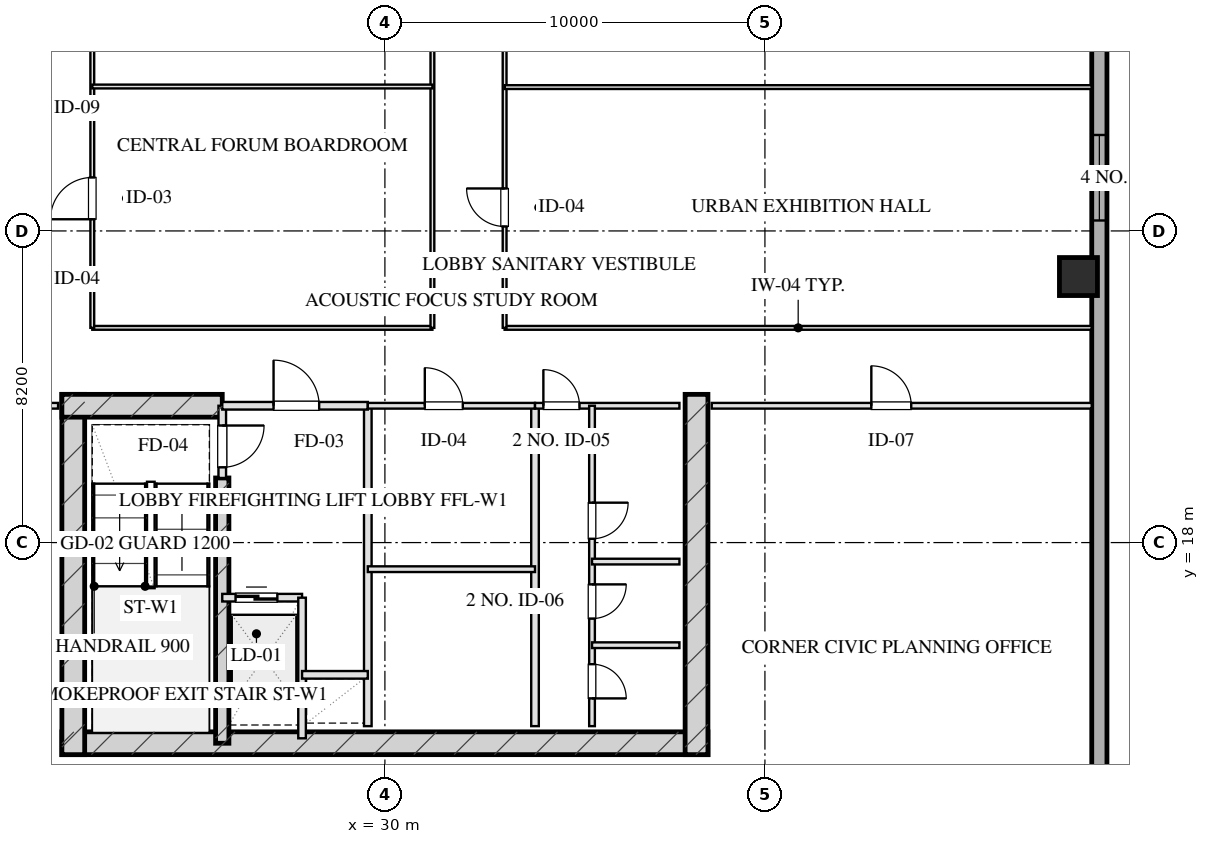
"""IFC4 building model, lengths in metres.
Left out: names, types, materials, properties, quantities, classifications, styles, units other than length and angle.
Written with IfcOpenShell. Run it as: python <this file> out.ifc"""

import sys

from ifc_helpers import new_model, si_unit, direction, frame, frame_2d, origin, origin_2d, place, context, subcontext, project, spatial, rectangle, hollow_rectangle, extrude, element, fill, save


model = new_model("IFC4")
c1 = context("Model", 3, precision=1e-05, world=origin(), true_north=direction((0.0, 1.0)))
c2 = subcontext(c1, "Body", "Model", "MODEL_VIEW")
j1 = project(units=[si_unit("LENGTHUNIT", "METRE"), si_unit("PLANEANGLEUNIT", "RADIAN")], contexts=[c1])
p1 = place(None, origin())
s1 = spatial("IfcSite", under=j1, at=p1, CompositionType="ELEMENT")
p2 = place(p1, origin())
s2 = spatial("IfcBuilding", under=s1, at=p2, CompositionType="ELEMENT")
p3 = place(p2, frame((0.0, 0.0, 149.5)))
s3 = spatial("IfcBuildingStorey", under=s2, at=p3, CompositionType="ELEMENT", Elevation=149.5)
p4 = place(p3, frame((21.5, 12.72, 0.0), z_axis=(0.0, 0.0, 1.0), x_axis=(1.0, 0.0, 0.0)))
e1 = element("IfcWall", 1, at=p4, inside=s3, PredefinedType="SHEAR", context=c2, shape_type="SweptSolid", body=[
    extrude(rectangle(XDim=17.0, YDim=0.6, at=frame_2d((8.5, 0.0))), origin(), (0.0, 0.0, 1.0), 3.45),
])
for number, where, z_axis, x_axis in (
    (2, (21.8, 21.9, 0.0), (0.0, 0.0, 1.0), (0.0, -1.0, 0.0)),
    (3, (38.2, 21.9, 0.0), (0.0, 0.0, 1.0), (0.0, -1.0, 0.0)),
):
    element("IfcWall", number, at=place(p3, frame(where, z_axis=z_axis, x_axis=x_axis)), inside=s3, PredefinedType="SHEAR", context=c2, shape_type="SweptSolid", body=[
        extrude(rectangle(XDim=9.48, YDim=0.6, at=frame_2d((4.74, 0.0))), origin(), (0.0, 0.0, 1.0), 3.45),
    ])
p5 = place(p3, frame((25.72, 19.7, 0.0), z_axis=(0.0, 0.0, 1.0), x_axis=(0.0, -1.0, 0.0)))
e4 = element("IfcWall", 4, at=p5, inside=s3, PredefinedType="SHEAR", context=c2, shape_type="SweptSolid", body=[
    extrude(rectangle(XDim=6.98, YDim=0.35, at=frame_2d((3.49, 0.0))), origin(), (0.0, 0.0, 1.0), 3.45),
])
p6 = place(p3, frame((21.5, 21.6, 0.0), z_axis=(0.0, 0.0, 1.0), x_axis=(1.0, 0.0, 0.0)))
e5 = element("IfcWall", 5, at=p6, inside=s3, PredefinedType="SHEAR", context=c2, shape_type="SweptSolid", body=[
    extrude(rectangle(XDim=4.22, YDim=0.6, at=frame_2d((2.11, 0.0))), origin(), (0.0, 0.0, 1.0), 3.45),
])
p7 = place(p3, frame((48.25, 25.0, 0.0), z_axis=(0.0, 0.0, 1.0), x_axis=(1.0, 0.0, 0.0)))
e6 = element("IfcColumn", 6, at=p7, inside=s3, PredefinedType="COLUMN", context=c2, shape_type="SweptSolid", body=[
    extrude(hollow_rectangle(XDim=1.0, YDim=1.0, WallThickness=0.036, at=origin_2d()), origin(), (0.0, 0.0, 1.0), 3.451),
])
p8 = place(p3, frame((48.8, 59.0, 0.0), z_axis=(0.0, 0.0, 1.0), x_axis=(0.0, -1.0, 0.0)))
e7 = element("IfcWall", 7, at=p8, inside=s3, PredefinedType="SOLIDWALL", context=c2, shape_type="SweptSolid", body=[
    extrude(rectangle(XDim=50.0, YDim=0.4, at=frame_2d((25.0, 0.0))), origin(), (0.0, 0.0, 1.0), 2.61),
])
p9 = place(p8, frame((30.275, 0.0, 0.75)))
e8 = element("IfcOpeningElement", 8, at=p9, cuts=e7, PredefinedType="OPENING", context=c2, shape_type="SweptSolid", body=[
    extrude(rectangle(XDim=2.25, YDim=1.46, at=frame_2d((1.125, 0.73))), frame((0.0, 0.21, 0.0), z_axis=(0.0, -1.0, 0.0), x_axis=(1.0, 0.0, 0.0)), (0.0, 0.0, 1.0), 0.42),
])
p10 = place(p8, frame((17.475, 0.0, 0.75)))
e9 = element("IfcOpeningElement", 9, at=p10, cuts=e7, PredefinedType="OPENING", context=c2, shape_type="SweptSolid", body=[
    extrude(rectangle(XDim=2.25, YDim=1.46, at=frame_2d((1.125, 0.73))), frame((0.0, 0.21, 0.0), z_axis=(0.0, -1.0, 0.0), x_axis=(1.0, 0.0, 0.0)), (0.0, 0.0, 1.0), 0.42),
])
p11 = place(p3, frame((25.72, 21.6, 0.0), z_axis=(0.0, 0.0, 1.0), x_axis=(0.0, -1.0, 0.0)))
e10 = element("IfcWall", 10, at=p11, inside=s3, PredefinedType="PARTITIONING", context=c2, shape_type="SweptSolid", body=[
    extrude(rectangle(XDim=1.9, YDim=0.2, at=frame_2d((0.95, 0.0))), origin(), (0.0, 0.0, 1.0), 3.175),
])
p12 = place(p11, frame((0.52, 0.0, 0.0)))
e11 = element("IfcOpeningElement", 11, at=p12, cuts=e10, PredefinedType="OPENING", context=c2, shape_type="SweptSolid", body=[
    extrude(rectangle(XDim=1.1, YDim=2.05, at=frame_2d((0.55, 1.025))), frame((0.0, 0.11, 0.0), z_axis=(0.0, -1.0, 0.0), x_axis=(1.0, 0.0, 0.0)), (0.0, 0.0, 1.0), 0.22),
])
p13 = place(p3, frame((29.55, 21.6, 0.0), z_axis=(0.0, 0.0, 1.0), x_axis=(0.0, -1.0, 0.0)))
e12 = element("IfcWall", 12, at=p13, inside=s3, PredefinedType="PARTITIONING", context=c2, shape_type="SweptSolid", body=[
    extrude(rectangle(XDim=8.43, YDim=0.2, at=frame_2d((4.215, 0.0))), origin(), (0.0, 0.0, 1.0), 3.175),
])
p14 = place(p3, frame((25.72, 21.6, 0.0), z_axis=(0.0, 0.0, 1.0), x_axis=(1.0, 0.0, 0.0)))
e13 = element("IfcWall", 13, at=p14, inside=s3, PredefinedType="PARTITIONING", context=c2, shape_type="SweptSolid", body=[
    extrude(rectangle(XDim=3.83, YDim=0.2, at=frame_2d((1.915, 0.0))), origin(), (0.0, 0.0, 1.0), 3.175),
])
p15 = place(p14, frame((1.35, 0.0, 0.0)))
e14 = element("IfcOpeningElement", 14, at=p15, cuts=e13, PredefinedType="OPENING", context=c2, shape_type="SweptSolid", body=[
    extrude(rectangle(XDim=1.2, YDim=2.05, at=frame_2d((0.6, 1.025))), frame((0.0, 0.11, 0.0), z_axis=(0.0, -1.0, 0.0), x_axis=(1.0, 0.0, 0.0)), (0.0, 0.0, 1.0), 0.22),
])
p16 = place(p3, frame((25.72, 16.55, 0.0), z_axis=(0.0, 0.0, 1.0), x_axis=(1.0, 0.0, 0.0)))
e15 = element("IfcWall", 15, at=p16, inside=s3, PredefinedType="PARTITIONING", context=c2, shape_type="SweptSolid", body=[
    extrude(rectangle(XDim=2.1, YDim=0.2, at=frame_2d((1.05, 0.0))), origin(), (0.0, 0.0, 1.0), 3.175),
])
p17 = place(p16, frame((0.35, 0.0, 0.0)))
e16 = element("IfcOpeningElement", 16, at=p17, cuts=e15, PredefinedType="OPENING", context=c2, shape_type="SweptSolid", body=[
    extrude(rectangle(XDim=1.1, YDim=2.05, at=frame_2d((0.55, 1.025))), frame((0.0, 0.11, 0.0), z_axis=(0.0, -1.0, 0.0), x_axis=(1.0, 0.0, 0.0)), (0.0, 0.0, 1.0), 0.22),
])
p18 = place(p3, frame((27.82, 16.55, 0.0), z_axis=(0.0, 0.0, 1.0), x_axis=(0.0, -1.0, 0.0)))
e17 = element("IfcWall", 17, at=p18, inside=s3, PredefinedType="PARTITIONING", context=c2, shape_type="SweptSolid", body=[
    extrude(rectangle(XDim=3.7, YDim=0.2, at=frame_2d((1.85, 0.0))), origin(), (0.0, 0.0, 1.0), 3.175),
])
p19 = place(p3, frame((27.82, 14.52, 0.0), z_axis=(0.0, 0.0, 1.0), x_axis=(1.0, 0.0, 0.0)))
e18 = element("IfcWall", 18, at=p19, inside=s3, PredefinedType="PARTITIONING", context=c2, shape_type="SweptSolid", body=[
    extrude(rectangle(XDim=1.73, YDim=0.2, at=frame_2d((0.865, 0.0))), origin(), (0.0, 0.0, 1.0), 3.175),
])
p20 = place(p3, frame((33.95, 21.6, 0.0), z_axis=(0.0, 0.0, 1.0), x_axis=(0.0, -1.0, 0.0)))
e19 = element("IfcWall", 19, at=p20, inside=s3, PredefinedType="PARTITIONING", context=c2, shape_type="SweptSolid", body=[
    extrude(rectangle(XDim=8.43, YDim=0.2, at=frame_2d((4.215, 0.0))), origin(), (0.0, 0.0, 1.0), 3.175),
])
p21 = place(p3, frame((29.55, 21.6, 0.0), z_axis=(0.0, 0.0, 1.0), x_axis=(1.0, 0.0, 0.0)))
e20 = element("IfcWall", 20, at=p21, inside=s3, PredefinedType="PARTITIONING", context=c2, shape_type="SweptSolid", body=[
    extrude(rectangle(XDim=4.4, YDim=0.15, at=frame_2d((2.2, 0.0))), origin(), (0.0, 0.0, 1.0), 3.175),
])
p22 = place(p21, frame((1.5, 0.0, 0.0)))
e21 = element("IfcOpeningElement", 21, at=p22, cuts=e20, PredefinedType="OPENING", context=c2, shape_type="SweptSolid", body=[
    extrude(rectangle(XDim=1.0, YDim=2.05, at=frame_2d((0.5, 1.025))), frame((0.0, 0.085, 0.0), z_axis=(0.0, -1.0, 0.0), x_axis=(1.0, 0.0, 0.0)), (0.0, 0.0, 1.0), 0.17),
])
p23 = place(p3, frame((29.55, 17.3, 0.0), z_axis=(0.0, 0.0, 1.0), x_axis=(1.0, 0.0, 0.0)))
e22 = element("IfcWall", 22, at=p23, inside=s3, PredefinedType="PARTITIONING", context=c2, shape_type="SweptSolid", body=[
    extrude(rectangle(XDim=4.4, YDim=0.15, at=frame_2d((2.2, 0.0))), origin(), (0.0, 0.0, 1.0), 3.175),
])
p24 = place(p3, frame((33.95, 21.6, 0.0), z_axis=(0.0, 0.0, 1.0), x_axis=(1.0, 0.0, 0.0)))
e23 = element("IfcWall", 23, at=p24, inside=s3, PredefinedType="PARTITIONING", context=c2, shape_type="SweptSolid", body=[
    extrude(rectangle(XDim=3.8, YDim=0.15, at=frame_2d((1.9, 0.0))), origin(), (0.0, 0.0, 1.0), 3.175),
])
p25 = place(p24, frame((0.22, 0.0, 0.0)))
e24 = element("IfcOpeningElement", 24, at=p25, cuts=e23, PredefinedType="OPENING", context=c2, shape_type="SweptSolid", body=[
    extrude(rectangle(XDim=0.95, YDim=2.05, at=frame_2d((0.475, 1.025))), frame((0.0, 0.085, 0.0), z_axis=(0.0, -1.0, 0.0), x_axis=(1.0, 0.0, 0.0)), (0.0, 0.0, 1.0), 0.17),
])
p26 = place(p3, frame((35.45, 21.6, 0.0), z_axis=(0.0, 0.0, 1.0), x_axis=(0.0, -1.0, 0.0)))
e25 = element("IfcWall", 25, at=p26, inside=s3, PredefinedType="PARTITIONING", context=c2, shape_type="SweptSolid", body=[
    extrude(rectangle(XDim=8.43, YDim=0.15, at=frame_2d((4.215, 0.0))), origin(), (0.0, 0.0, 1.0), 2.815),
])
p27 = place(p26, frame((2.55, 0.0, 0.0)))
e26 = element("IfcOpeningElement", 26, at=p27, cuts=e25, PredefinedType="OPENING", context=c2, shape_type="SweptSolid", body=[
    extrude(rectangle(XDim=0.95, YDim=2.05, at=frame_2d((0.475, 1.025))), frame((0.0, 0.085, 0.0), z_axis=(0.0, -1.0, 0.0), x_axis=(1.0, 0.0, 0.0)), (0.0, 0.0, 1.0), 0.17),
])
p28 = place(p26, frame((4.7, 0.0, 0.0)))
e27 = element("IfcOpeningElement", 27, at=p28, cuts=e25, PredefinedType="OPENING", context=c2, shape_type="SweptSolid", body=[
    extrude(rectangle(XDim=0.9, YDim=2.05, at=frame_2d((0.45, 1.025))), frame((0.0, 0.085, 0.0), z_axis=(0.0, -1.0, 0.0), x_axis=(1.0, 0.0, 0.0)), (0.0, 0.0, 1.0), 0.17),
])
p29 = place(p26, frame((6.8, 0.0, 0.0)))
e28 = element("IfcOpeningElement", 28, at=p29, cuts=e25, PredefinedType="OPENING", context=c2, shape_type="SweptSolid", body=[
    extrude(rectangle(XDim=0.9, YDim=2.05, at=frame_2d((0.45, 1.025))), frame((0.0, 0.085, 0.0), z_axis=(0.0, -1.0, 0.0), x_axis=(1.0, 0.0, 0.0)), (0.0, 0.0, 1.0), 0.17),
])
for number, where, z_axis, x_axis in (
    (29, (35.45, 17.5, 0.0), (0.0, 0.0, 1.0), (1.0, 0.0, 0.0)),
    (30, (35.45, 15.3, 0.0), (0.0, 0.0, 1.0), (1.0, 0.0, 0.0)),
):
    element("IfcWall", number, at=place(p3, frame(where, z_axis=z_axis, x_axis=x_axis)), inside=s3, PredefinedType="PARTITIONING", context=c2, shape_type="SweptSolid", body=[
        extrude(rectangle(XDim=2.3, YDim=0.15, at=frame_2d((1.15, 0.0))), origin(), (0.0, 0.0, 1.0), 3.175),
    ])
p30 = place(p3, frame((11.4, 21.6, 0.0), z_axis=(0.0, 0.0, 1.0), x_axis=(1.0, 0.0, 0.0)))
e31 = element("IfcWall", 31, at=p30, inside=s3, PredefinedType="PARTITIONING", context=c2, shape_type="SweptSolid", body=[
    extrude(rectangle(XDim=10.0, YDim=0.15, at=frame_2d((5.0, 0.0))), origin(), (0.0, 0.0, 1.0), 3.175),
])
p31 = place(p30, frame((4.2, 0.0, 0.0)))
e32 = element("IfcOpeningElement", 32, at=p31, cuts=e31, PredefinedType="OPENING", context=c2, shape_type="SweptSolid", body=[
    extrude(rectangle(XDim=1.0, YDim=2.05, at=frame_2d((0.5, 1.025))), frame((0.0, 0.085, 0.0), z_axis=(0.0, -1.0, 0.0), x_axis=(1.0, 0.0, 0.0)), (0.0, 0.0, 1.0), 0.17),
])
p32 = place(p3, frame((38.6, 21.6, 0.0), z_axis=(0.0, 0.0, 1.0), x_axis=(1.0, 0.0, 0.0)))
e33 = element("IfcWall", 33, at=p32, inside=s3, PredefinedType="PARTITIONING", context=c2, shape_type="SweptSolid", body=[
    extrude(rectangle(XDim=10.0, YDim=0.15, at=frame_2d((5.0, 0.0))), origin(), (0.0, 0.0, 1.0), 3.175),
])
p33 = place(p32, frame((4.2, 0.0, 0.0)))
e34 = element("IfcOpeningElement", 34, at=p33, cuts=e33, PredefinedType="OPENING", context=c2, shape_type="SweptSolid", body=[
    extrude(rectangle(XDim=1.05, YDim=2.05, at=frame_2d((0.525, 1.025))), frame((0.0, 0.085, 0.0), z_axis=(0.0, -1.0, 0.0), x_axis=(1.0, 0.0, 0.0)), (0.0, 0.0, 1.0), 0.17),
])
p34 = place(p3, frame((22.3, 23.65, 0.0), z_axis=(0.0, 0.0, 1.0), x_axis=(1.0, 0.0, 0.0)))
e35 = element("IfcWall", 35, at=p34, inside=s3, PredefinedType="MOVABLE", context=c2, shape_type="SweptSolid", body=[
    extrude(rectangle(XDim=8.95, YDim=0.1, at=frame_2d((4.475, 0.0))), origin(), (0.0, 0.0, 1.0), 3.175),
])
p35 = place(p3, frame((33.15, 23.65, 0.0), z_axis=(0.0, 0.0, 1.0), x_axis=(1.0, 0.0, 0.0)))
e36 = element("IfcWall", 36, at=p35, inside=s3, PredefinedType="MOVABLE", context=c2, shape_type="SweptSolid", body=[
    extrude(rectangle(XDim=15.45, YDim=0.1, at=frame_2d((7.725, 0.0))), origin(), (0.0, 0.0, 1.0), 3.175),
])
p36 = place(p3, frame((22.3, 23.65, 0.0), z_axis=(0.0, 0.0, 1.0), x_axis=(0.0, 1.0, 0.0)))
e37 = element("IfcWall", 37, at=p36, inside=s3, PredefinedType="MOVABLE", context=c2, shape_type="SweptSolid", body=[
    extrude(rectangle(XDim=20.7, YDim=0.1, at=frame_2d((10.35, 0.0))), origin(), (0.0, 0.0, 1.0), 3.175),
])
p37 = place(p36, frame((2.857, 0.0, 0.0)))
e38 = element("IfcOpeningElement", 38, at=p37, cuts=e37, PredefinedType="OPENING", context=c2, shape_type="SweptSolid", body=[
    extrude(rectangle(XDim=1.1, YDim=2.05, at=frame_2d((0.55, 1.025))), frame((0.0, 0.06, 0.0), z_axis=(0.0, -1.0, 0.0), x_axis=(1.0, 0.0, 0.0)), (0.0, 0.0, 1.0), 0.12),
])
p38 = place(p36, frame((17.208, 0.0, 0.0)))
e39 = element("IfcOpeningElement", 39, at=p38, cuts=e37, PredefinedType="OPENING", context=c2, shape_type="SweptSolid", body=[
    extrude(rectangle(XDim=1.1, YDim=2.05, at=frame_2d((0.55, 1.025))), frame((0.0, 0.06, 0.0), z_axis=(0.0, -1.0, 0.0), x_axis=(1.0, 0.0, 0.0)), (0.0, 0.0, 1.0), 0.12),
])
p39 = place(p3, frame((31.25, 23.65, 0.0), z_axis=(0.0, 0.0, 1.0), x_axis=(0.0, 1.0, 0.0)))
e40 = element("IfcWall", 40, at=p39, inside=s3, PredefinedType="MOVABLE", context=c2, shape_type="SweptSolid", body=[
    extrude(rectangle(XDim=20.7, YDim=0.1, at=frame_2d((10.35, 0.0))), origin(), (0.0, 0.0, 1.0), 3.175),
])
p40 = place(p39, frame((9.71, 0.0, 0.0)))
e41 = element("IfcOpeningElement", 41, at=p40, cuts=e40, PredefinedType="OPENING", context=c2, shape_type="SweptSolid", body=[
    extrude(rectangle(XDim=1.1, YDim=2.05, at=frame_2d((0.55, 1.025))), frame((0.0, 0.06, 0.0), z_axis=(0.0, -1.0, 0.0), x_axis=(1.0, 0.0, 0.0)), (0.0, 0.0, 1.0), 0.12),
])
p41 = place(p3, frame((33.15, 23.65, 0.0), z_axis=(0.0, 0.0, 1.0), x_axis=(0.0, 1.0, 0.0)))
e42 = element("IfcWall", 42, at=p41, inside=s3, PredefinedType="MOVABLE", context=c2, shape_type="SweptSolid", body=[
    extrude(rectangle(XDim=20.7, YDim=0.1, at=frame_2d((10.35, 0.0))), origin(), (0.0, 0.0, 1.0), 3.175),
])
p42 = place(p41, frame((2.667, 0.0, 0.0)))
e43 = element("IfcOpeningElement", 43, at=p42, cuts=e42, PredefinedType="OPENING", context=c2, shape_type="SweptSolid", body=[
    extrude(rectangle(XDim=1.0, YDim=2.05, at=frame_2d((0.5, 1.025))), frame((0.0, 0.06, 0.0), z_axis=(0.0, -1.0, 0.0), x_axis=(1.0, 0.0, 0.0)), (0.0, 0.0, 1.0), 0.12),
])
p43 = place(p41, frame((9.843, 0.0, 0.0)))
e44 = element("IfcOpeningElement", 44, at=p43, cuts=e42, PredefinedType="OPENING", context=c2, shape_type="SweptSolid", body=[
    extrude(rectangle(XDim=1.0, YDim=2.05, at=frame_2d((0.5, 1.025))), frame((0.0, 0.06, 0.0), z_axis=(0.0, -1.0, 0.0), x_axis=(1.0, 0.0, 0.0)), (0.0, 0.0, 1.0), 0.12),
])
p44 = place(p41, frame((17.025, 0.0, 0.0)))
e45 = element("IfcOpeningElement", 45, at=p44, cuts=e42, PredefinedType="OPENING", context=c2, shape_type="SweptSolid", body=[
    extrude(rectangle(XDim=1.0, YDim=2.05, at=frame_2d((0.5, 1.025))), frame((0.0, 0.06, 0.0), z_axis=(0.0, -1.0, 0.0), x_axis=(1.0, 0.0, 0.0)), (0.0, 0.0, 1.0), 0.12),
])
p45 = place(p3, frame((22.3, 30.0, 0.0), z_axis=(0.0, 0.0, 1.0), x_axis=(1.0, 0.0, 0.0)))
e46 = element("IfcWall", 46, at=p45, inside=s3, PredefinedType="MOVABLE", context=c2, shape_type="SweptSolid", body=[
    extrude(rectangle(XDim=8.95, YDim=0.1, at=frame_2d((4.475, 0.0))), origin(), (0.0, 0.0, 1.0), 3.175),
])
p46 = place(p3, frame((33.15, 29.985, 0.0), z_axis=(0.0, 0.0, 1.0), x_axis=(1.0, 0.0, 0.0)))
e47 = element("IfcWall", 47, at=p46, inside=s3, PredefinedType="MOVABLE", context=c2, shape_type="SweptSolid", body=[
    extrude(rectangle(XDim=15.45, YDim=0.1, at=frame_2d((7.725, 0.0))), origin(), (0.0, 0.0, 1.0), 3.175),
])
p47 = place(p9, origin())
e48 = element("IfcWindow", 48, at=p47, inside=s3, PartitioningType="TRIPLE_PANEL_VERTICAL", PredefinedType="WINDOW", context=c2, shape_type="SweptSolid", body=[
    extrude(rectangle(XDim=2.25, YDim=1.46, at=frame_2d((1.125, 0.73))), frame((0.0, 0.03, 0.0), z_axis=(0.0, -1.0, 0.0), x_axis=(1.0, 0.0, 0.0)), (0.0, 0.0, 1.0), 0.06),
])
fill(e8, e48)
p48 = place(p12, origin())
e49 = element("IfcDoor", 49, at=p48, inside=s3, OperationType="SINGLE_SWING_LEFT", PredefinedType="DOOR", context=c2, shape_type="SweptSolid", body=[
    extrude(rectangle(XDim=1.1, YDim=2.05, at=frame_2d((0.55, 1.025))), frame((0.0, 0.025, 0.0), z_axis=(0.0, -1.0, 0.0), x_axis=(1.0, 0.0, 0.0)), (0.0, 0.0, 1.0), 0.05),
])
fill(e11, e49)
p49 = place(p15, origin())
e50 = element("IfcDoor", 50, at=p49, inside=s3, OperationType="SINGLE_SWING_LEFT", PredefinedType="DOOR", context=c2, shape_type="SweptSolid", body=[
    extrude(rectangle(XDim=1.2, YDim=2.05, at=frame_2d((0.6, 1.025))), frame((0.0, 0.025, 0.0), z_axis=(0.0, -1.0, 0.0), x_axis=(1.0, 0.0, 0.0)), (0.0, 0.0, 1.0), 0.05),
])
fill(e14, e50)
p50 = place(p17, origin())
e51 = element("IfcDoor", 51, at=p50, inside=s3, OperationType="DOUBLE_DOOR_SLIDING", PredefinedType="DOOR", context=c2, shape_type="SweptSolid", body=[
    extrude(rectangle(XDim=1.1, YDim=2.05, at=frame_2d((0.55, 1.025))), frame((0.0, 0.025, 0.0), z_axis=(0.0, -1.0, 0.0), x_axis=(1.0, 0.0, 0.0)), (0.0, 0.0, 1.0), 0.05),
])
fill(e16, e51)
p51 = place(p22, origin())
e52 = element("IfcDoor", 52, at=p51, inside=s3, OperationType="SINGLE_SWING_LEFT", PredefinedType="DOOR", context=c2, shape_type="SweptSolid", body=[
    extrude(rectangle(XDim=1.0, YDim=2.05, at=frame_2d((0.5, 1.025))), frame((0.0, 0.025, 0.0), z_axis=(0.0, -1.0, 0.0), x_axis=(1.0, 0.0, 0.0)), (0.0, 0.0, 1.0), 0.05),
])
fill(e21, e52)
p52 = place(p25, origin())
e53 = element("IfcDoor", 53, at=p52, inside=s3, OperationType="SINGLE_SWING_LEFT", PredefinedType="DOOR", context=c2, shape_type="SweptSolid", body=[
    extrude(rectangle(XDim=0.95, YDim=2.05, at=frame_2d((0.475, 1.025))), frame((0.0, 0.025, 0.0), z_axis=(0.0, -1.0, 0.0), x_axis=(1.0, 0.0, 0.0)), (0.0, 0.0, 1.0), 0.05),
])
fill(e24, e53)
p53 = place(p27, origin())
e54 = element("IfcDoor", 54, at=p53, inside=s3, OperationType="SINGLE_SWING_LEFT", PredefinedType="DOOR", context=c2, shape_type="SweptSolid", body=[
    extrude(rectangle(XDim=0.95, YDim=2.05, at=frame_2d((0.475, 1.025))), frame((0.0, 0.025, 0.0), z_axis=(0.0, -1.0, 0.0), x_axis=(1.0, 0.0, 0.0)), (0.0, 0.0, 1.0), 0.05),
])
fill(e26, e54)
p54 = place(p28, origin())
e55 = element("IfcDoor", 55, at=p54, inside=s3, OperationType="SINGLE_SWING_LEFT", PredefinedType="DOOR", context=c2, shape_type="SweptSolid", body=[
    extrude(rectangle(XDim=0.9, YDim=2.05, at=frame_2d((0.45, 1.025))), frame((0.0, 0.025, 0.0), z_axis=(0.0, -1.0, 0.0), x_axis=(1.0, 0.0, 0.0)), (0.0, 0.0, 1.0), 0.05),
])
fill(e27, e55)
p55 = place(p29, origin())
e56 = element("IfcDoor", 56, at=p55, inside=s3, OperationType="SINGLE_SWING_RIGHT", PredefinedType="DOOR", context=c2, shape_type="SweptSolid", body=[
    extrude(rectangle(XDim=0.9, YDim=2.05, at=frame_2d((0.45, 1.025))), frame((0.0, 0.025, 0.0), z_axis=(0.0, -1.0, 0.0), x_axis=(1.0, 0.0, 0.0)), (0.0, 0.0, 1.0), 0.05),
])
fill(e28, e56)
p56 = place(p33, origin())
e57 = element("IfcDoor", 57, at=p56, inside=s3, OperationType="SINGLE_SWING_LEFT", PredefinedType="DOOR", context=c2, shape_type="SweptSolid", body=[
    extrude(rectangle(XDim=1.05, YDim=2.05, at=frame_2d((0.525, 1.025))), frame((0.0, 0.025, 0.0), z_axis=(0.0, -1.0, 0.0), x_axis=(1.0, 0.0, 0.0)), (0.0, 0.0, 1.0), 0.05),
])
fill(e34, e57)
p57 = place(p37, origin())
e58 = element("IfcDoor", 58, at=p57, inside=s3, OperationType="SINGLE_SWING_LEFT", PredefinedType="DOOR", context=c2, shape_type="SweptSolid", body=[
    extrude(rectangle(XDim=1.1, YDim=2.05, at=frame_2d((0.55, 1.025))), frame((0.0, 0.025, 0.0), z_axis=(0.0, -1.0, 0.0), x_axis=(1.0, 0.0, 0.0)), (0.0, 0.0, 1.0), 0.05),
])
fill(e38, e58)
p58 = place(p42, origin())
e59 = element("IfcDoor", 59, at=p58, inside=s3, OperationType="SINGLE_SWING_RIGHT", PredefinedType="DOOR", context=c2, shape_type="SweptSolid", body=[
    extrude(rectangle(XDim=1.0, YDim=2.05, at=frame_2d((0.5, 1.025))), frame((0.0, 0.025, 0.0), z_axis=(0.0, -1.0, 0.0), x_axis=(1.0, 0.0, 0.0)), (0.0, 0.0, 1.0), 0.05),
])
fill(e43, e59)
save(model, sys.argv[1])
